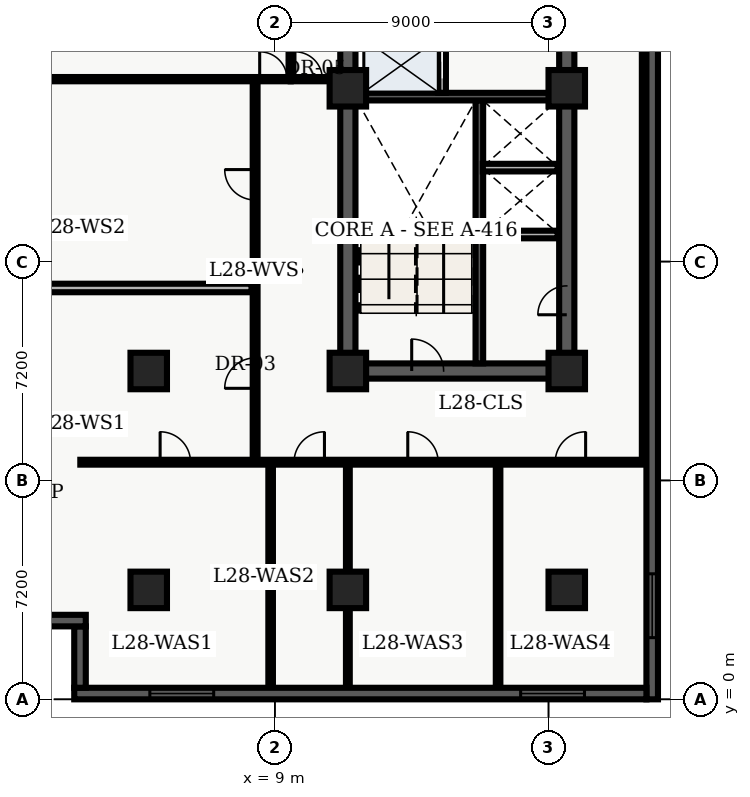
"""IFC4 building model, lengths in metres.
Left out: names, types, materials, properties, quantities, classifications, styles, units other than length and angle.
Written with IfcOpenShell. Run it as: python <this file> out.ifc"""

import sys

from ifc_helpers import new_model, entity, si_unit, converted_unit, direction, frame, origin_with_axes, origin_2d_with_axis, place, context, subcontext, project, spatial, polyline, rectangle, outline, extrude, element, fill, save


model = new_model("IFC4")
c1 = context("Model", 3, precision=1e-05, world=origin_with_axes(), true_north=direction((0.0, 1.0)))
c2 = subcontext(c1, "Body", "Model", "MODEL_VIEW")
j1 = project(units=[si_unit("LENGTHUNIT", "METRE"), converted_unit("PLANEANGLEUNIT", "DEGREE", entity("IfcPlaneAngleMeasure", 0.017), si_unit("PLANEANGLEUNIT", "RADIAN"), dimensions=[0, 0, 0, 0, 0, 0, 0])], contexts=[c1])
p1 = place(None, origin_with_axes())
s1 = spatial("IfcSite", under=j1, at=p1, CompositionType="ELEMENT")
p2 = place(p1, origin_with_axes())
s2 = spatial("IfcBuilding", under=s1, at=p2, CompositionType="ELEMENT")
p3 = place(p2, frame((0.0, 0.0, 116.4), z_axis=(0.0, 0.0, 1.0), x_axis=(1.0, 0.0, 0.0)))
s3 = spatial("IfcBuildingStorey", under=s2, at=p3, CompositionType="ELEMENT", Elevation=116.4)
p4 = place(p3, frame((11.4, 10.8, 0.0), z_axis=(0.0, 0.0, 1.0), x_axis=(0.0, 1.0, 0.0)))
e1 = element("IfcWall", 1, at=p4, inside=s3, PredefinedType="SHEAR", context=c2, shape_type="SweptSolid", body=[
    extrude(outline(polyline([(0.0, -0.25), (27.0, -0.25), (27.0, 0.25), (0.0, 0.25), (0.0, -0.25)])), origin_with_axes(), (0.0, 0.0, 1.0), 3.66),
])
p5 = place(p3, frame((11.4, 10.8, 0.0), z_axis=(0.0, 0.0, 1.0), x_axis=(1.0, 0.0, 0.0)))
e2 = element("IfcWall", 2, at=p5, inside=s3, PredefinedType="SHEAR", context=c2, shape_type="SweptSolid", body=[
    extrude(outline(polyline([(0.0, -0.25), (7.2, -0.25), (7.2, 0.25), (0.0, 0.25), (0.0, -0.25)])), origin_with_axes(), (0.0, 0.0, 1.0), 3.66),
])
p6 = place(p5, frame((2.625, 0.0, 0.0), z_axis=(0.0, 0.0, 1.0), x_axis=(1.0, 0.0, 0.0)))
e3 = element("IfcOpeningElement", 3, at=p6, cuts=e2, PredefinedType="OPENING", context=c2, shape_type="SweptSolid", body=[
    extrude(rectangle(XDim=1.05, YDim=0.52, at=origin_2d_with_axis()), origin_with_axes(), (0.0, 0.0, 1.0), 2.15),
])
p7 = place(p3, frame((18.6, 10.8, 0.0), z_axis=(0.0, 0.0, 1.0), x_axis=(0.0, 1.0, 0.0)))
e4 = element("IfcWall", 4, at=p7, inside=s3, PredefinedType="SHEAR", context=c2, shape_type="SweptSolid", body=[
    extrude(outline(polyline([(0.0, -0.25), (13.5, -0.25), (13.5, 0.25), (0.0, 0.25), (0.0, -0.25)])), origin_with_axes(), (0.0, 0.0, 1.0), 3.66),
])
p8 = place(p7, frame((11.125, 0.0, 0.0), z_axis=(0.0, 0.0, 1.0), x_axis=(1.0, 0.0, 0.0)))
e5 = element("IfcOpeningElement", 5, at=p8, cuts=e4, PredefinedType="OPENING", context=c2, shape_type="SweptSolid", body=[
    extrude(rectangle(XDim=1.05, YDim=0.52, at=origin_2d_with_axis()), origin_with_axes(), (0.0, 0.0, 1.0), 2.15),
])
p9 = place(p7, frame((2.325, 0.0, 0.0), z_axis=(0.0, 0.0, 1.0), x_axis=(1.0, 0.0, 0.0)))
e6 = element("IfcOpeningElement", 6, at=p9, cuts=e4, PredefinedType="OPENING", context=c2, shape_type="SweptSolid", body=[
    extrude(rectangle(XDim=0.95, YDim=0.52, at=origin_2d_with_axis()), origin_with_axes(), (0.0, 0.0, 1.0), 2.15),
])
p10 = place(p3, frame((15.725, 11.05, 0.0), z_axis=(0.0, 0.0, 1.0), x_axis=(0.0, 1.0, 0.0)))
e7 = element("IfcWall", 7, at=p10, inside=s3, PredefinedType="SHEAR", context=c2, shape_type="SweptSolid", body=[
    extrude(outline(polyline([(0.0, -0.125), (8.65, -0.125), (8.65, 0.125), (0.0, 0.125), (0.0, -0.125)])), origin_with_axes(), (0.0, 0.0, 1.0), 3.66),
])
p11 = place(p3, frame((11.65, 19.825, 0.0), z_axis=(0.0, 0.0, 1.0), x_axis=(1.0, 0.0, 0.0)))
e8 = element("IfcWall", 8, at=p11, inside=s3, PredefinedType="SHEAR", context=c2, shape_type="SweptSolid", body=[
    extrude(outline(polyline([(0.0, -0.125), (6.7, -0.125), (6.7, 0.125), (0.0, 0.125), (0.0, -0.125)])), origin_with_axes(), (0.0, 0.0, 1.0), 3.66),
])
p12 = place(p3, frame((14.5, 19.95, 0.0), z_axis=(0.0, 0.0, 1.0), x_axis=(0.0, 1.0, 0.0)))
e9 = element("IfcWall", 9, at=p12, inside=s3, PredefinedType="SOLIDWALL", context=c2, shape_type="SweptSolid", body=[
    extrude(outline(polyline([(0.0, -0.125), (6.25, -0.125), (6.25, 0.125), (0.0, 0.125), (0.0, -0.125)])), origin_with_axes(), (0.0, 0.0, 1.0), 2.7),
])
p13 = place(p12, frame((1.025, 0.0, 0.0), z_axis=(0.0, 0.0, 1.0), x_axis=(1.0, 0.0, 0.0)))
e10 = element("IfcOpeningElement", 10, at=p13, cuts=e9, PredefinedType="OPENING", context=c2, shape_type="SweptSolid", body=[
    extrude(rectangle(XDim=1.1, YDim=0.27, at=origin_2d_with_axis()), origin_with_axes(), (0.0, 0.0, 1.0), 2.15),
])
p14 = place(p12, frame((2.975, 0.0, 0.0), z_axis=(0.0, 0.0, 1.0), x_axis=(1.0, 0.0, 0.0)))
e11 = element("IfcOpeningElement", 11, at=p14, cuts=e9, PredefinedType="OPENING", context=c2, shape_type="SweptSolid", body=[
    extrude(rectangle(XDim=1.1, YDim=0.27, at=origin_2d_with_axis()), origin_with_axes(), (0.0, 0.0, 1.0), 2.15),
])
p15 = place(p12, frame((5.425, 0.0, 0.0), z_axis=(0.0, 0.0, 1.0), x_axis=(1.0, 0.0, 0.0)))
e12 = element("IfcOpeningElement", 12, at=p15, cuts=e9, PredefinedType="OPENING", context=c2, shape_type="SweptSolid", body=[
    extrude(rectangle(XDim=1.2, YDim=0.27, at=origin_2d_with_axis()), origin_with_axes(), (0.0, 0.0, 1.0), 2.15),
])
for number, where, z_axis, x_axis in (
    (13, (11.4, 3.6, 0.0), (0.0, 0.0, 1.0), (1.0, 0.0, 0.0)),
    (14, (11.4, 10.8, 0.0), (0.0, 0.0, 1.0), (1.0, 0.0, 0.0)),
    (15, (11.4, 20.1, 0.0), (0.0, 0.0, 1.0), (1.0, 0.0, 0.0)),
    (16, (18.6, 3.6, 0.0), (0.0, 0.0, 1.0), (1.0, 0.0, 0.0)),
    (17, (18.6, 10.8, 0.0), (0.0, 0.0, 1.0), (1.0, 0.0, 0.0)),
    (18, (18.6, 20.1, 0.0), (0.0, 0.0, 1.0), (1.0, 0.0, 0.0)),
    (19, (4.85, 3.6, 0.0), (0.0, 0.0, 1.0), (1.0, 0.0, 0.0)),
    (20, (4.85, 10.8, 0.0), (0.0, 0.0, 1.0), (1.0, 0.0, 0.0)),
):
    element("IfcColumn", number, at=place(p3, frame(where, z_axis=z_axis, x_axis=x_axis)), inside=s3, PredefinedType="COLUMN", context=c2, shape_type="SweptSolid", body=[
        extrude(rectangle(XDim=1.2, YDim=1.2, at=origin_2d_with_axis()), origin_with_axes(), (0.0, 0.0, 1.0), 3.9),
    ])
for number, where, z_axis, x_axis in (
    (21, (15.84, 15.29, 0.0), (0.0, 0.0, 1.0), (1.0, 0.0, 0.0)),
    (22, (15.84, 17.49, 0.0), (0.0, 0.0, 1.0), (1.0, 0.0, 0.0)),
):
    element("IfcWall", number, at=place(p3, frame(where, z_axis=z_axis, x_axis=x_axis)), inside=s3, PredefinedType="SOLIDWALL", context=c2, shape_type="SweptSolid", body=[
        extrude(outline(polyline([(0.0, -0.125), (2.46, -0.125), (2.46, 0.125), (0.0, 0.125), (0.0, -0.125)])), origin_with_axes(), (0.0, 0.0, 1.0), 2.7),
    ])
p16 = place(p3, frame((9.52, 20.4, 0.0), z_axis=(0.0, 0.0, 1.0), x_axis=(0.0, 1.0, 0.0)))
e23 = element("IfcWall", 23, at=p16, inside=s3, PredefinedType="PARTITIONING", context=c2, shape_type="SweptSolid", body=[
    extrude(outline(polyline([(0.0, -0.07), (4.0, -0.07), (4.0, 0.07), (0.0, 0.07), (0.0, -0.07)])), origin_with_axes(), (0.0, 0.0, 1.0), 2.7),
])
p17 = place(p3, frame((9.52, 20.4, 0.0), z_axis=(0.0, 0.0, 1.0), x_axis=(1.0, 0.0, 0.0)))
e24 = element("IfcWall", 24, at=p17, inside=s3, PredefinedType="PARTITIONING", context=c2, shape_type="SweptSolid", body=[
    extrude(outline(polyline([(0.0, -0.07), (1.58, -0.07), (1.58, 0.07), (0.0, 0.07), (0.0, -0.07)])), origin_with_axes(), (0.0, 0.0, 1.0), 2.7),
])
p18 = place(p17, frame((0.59, 0.0, 0.0), z_axis=(0.0, 0.0, 1.0), x_axis=(1.0, 0.0, 0.0)))
e25 = element("IfcOpeningElement", 25, at=p18, cuts=e24, PredefinedType="OPENING", context=c2, shape_type="SweptSolid", body=[
    extrude(rectangle(XDim=0.9, YDim=0.16, at=origin_2d_with_axis()), origin_with_axes(), (0.0, 0.0, 1.0), 2.15),
])
p19 = place(p3, frame((2.6, 7.8, 0.0), z_axis=(0.0, 0.0, 1.0), x_axis=(1.0, 0.0, 0.0)))
e26 = element("IfcWall", 26, at=p19, inside=s3, PredefinedType="PARTITIONING", context=c2, shape_type="SweptSolid", body=[
    extrude(outline(polyline([(0.0, -0.08), (18.625, -0.08), (18.625, 0.08), (0.0, 0.08), (0.0, -0.08)])), origin_with_axes(), (0.0, 0.0, 1.0), 2.7),
])
p20 = place(p19, frame((3.125, 0.0, 0.0), z_axis=(0.0, 0.0, 1.0), x_axis=(1.0, 0.0, 0.0)))
e27 = element("IfcOpeningElement", 27, at=p20, cuts=e26, PredefinedType="OPENING", context=c2, shape_type="SweptSolid", body=[
    extrude(rectangle(XDim=1.0, YDim=0.18, at=origin_2d_with_axis()), origin_with_axes(), (0.0, 0.0, 1.0), 2.15),
])
p21 = place(p19, frame((7.53, 0.0, 0.0), z_axis=(0.0, 0.0, 1.0), x_axis=(1.0, 0.0, 0.0)))
e28 = element("IfcOpeningElement", 28, at=p21, cuts=e26, PredefinedType="OPENING", context=c2, shape_type="SweptSolid", body=[
    extrude(rectangle(XDim=1.0, YDim=0.18, at=origin_2d_with_axis()), origin_with_axes(), (0.0, 0.0, 1.0), 2.15),
])
p22 = place(p19, frame((11.271, 0.0, 0.0), z_axis=(0.0, 0.0, 1.0), x_axis=(1.0, 0.0, 0.0)))
e29 = element("IfcOpeningElement", 29, at=p22, cuts=e26, PredefinedType="OPENING", context=c2, shape_type="SweptSolid", body=[
    extrude(rectangle(XDim=1.0, YDim=0.18, at=origin_2d_with_axis()), origin_with_axes(), (0.0, 0.0, 1.0), 2.15),
])
p23 = place(p19, frame((16.12, 0.0, 0.0), z_axis=(0.0, 0.0, 1.0), x_axis=(1.0, 0.0, 0.0)))
e30 = element("IfcOpeningElement", 30, at=p23, cuts=e26, PredefinedType="OPENING", context=c2, shape_type="SweptSolid", body=[
    extrude(rectangle(XDim=1.0, YDim=0.18, at=origin_2d_with_axis()), origin_with_axes(), (0.0, 0.0, 1.0), 2.15),
])
p24 = place(p3, frame((21.15, 7.8, 0.0), z_axis=(0.0, 0.0, 1.0), x_axis=(0.0, 1.0, 0.0)))
e31 = element("IfcWall", 31, at=p24, inside=s3, PredefinedType="PARTITIONING", context=c2, shape_type="SweptSolid", body=[
    extrude(outline(polyline([(0.0, -0.08), (32.7, -0.08), (32.7, 0.08), (0.0, 0.08), (0.0, -0.08)])), origin_with_axes(), (0.0, 0.0, 1.0), 2.7),
])
p25 = place(p3, frame((8.35, 7.8, 0.0), z_axis=(0.0, 0.0, 1.0), x_axis=(0.0, 1.0, 0.0)))
e32 = element("IfcWall", 32, at=p25, inside=s3, PredefinedType="PARTITIONING", context=c2, shape_type="SweptSolid", body=[
    extrude(outline(polyline([(0.0, -0.08), (12.6, -0.08), (12.6, 0.08), (0.0, 0.08), (0.0, -0.08)])), origin_with_axes(), (0.0, 0.0, 1.0), 2.7),
])
p26 = place(p25, frame((2.93, 0.0, 0.0), z_axis=(0.0, 0.0, 1.0), x_axis=(1.0, 0.0, 0.0)))
e33 = element("IfcOpeningElement", 33, at=p26, cuts=e32, PredefinedType="OPENING", context=c2, shape_type="SweptSolid", body=[
    extrude(rectangle(XDim=1.0, YDim=0.18, at=origin_2d_with_axis()), origin_with_axes(), (0.0, 0.0, 1.0), 2.15),
])
p27 = place(p25, frame((9.126, 0.0, 0.0), z_axis=(0.0, 0.0, 1.0), x_axis=(1.0, 0.0, 0.0)))
e34 = element("IfcOpeningElement", 34, at=p27, cuts=e32, PredefinedType="OPENING", context=c2, shape_type="SweptSolid", body=[
    extrude(rectangle(XDim=1.0, YDim=0.18, at=origin_2d_with_axis()), origin_with_axes(), (0.0, 0.0, 1.0), 2.15),
])
p28 = place(p3, frame((0.36, 20.4, 0.0), z_axis=(0.0, 0.0, 1.0), x_axis=(1.0, 0.0, 0.0)))
e35 = element("IfcWall", 35, at=p28, inside=s3, PredefinedType="PARTITIONING", context=c2, shape_type="SweptSolid", body=[
    extrude(outline(polyline([(0.0, -0.07), (9.16, -0.07), (9.16, 0.07), (0.0, 0.07), (0.0, -0.07)])), origin_with_axes(), (0.0, 0.0, 1.0), 2.7),
])
p29 = place(p28, frame((8.59, 0.0, 0.0), z_axis=(0.0, 0.0, 1.0), x_axis=(1.0, 0.0, 0.0)))
e36 = element("IfcOpeningElement", 36, at=p29, cuts=e35, PredefinedType="OPENING", context=c2, shape_type="SweptSolid", body=[
    extrude(rectangle(XDim=0.9, YDim=0.16, at=origin_2d_with_axis()), origin_with_axes(), (0.0, 0.0, 1.0), 2.15),
])
p30 = place(p3, frame((0.375, 13.531, 0.0), z_axis=(0.0, 0.0, 1.0), x_axis=(1.0, 0.0, 0.0)))
e37 = element("IfcWall", 37, at=p30, inside=s3, PredefinedType="PARTITIONING", context=c2, shape_type="SweptSolid", body=[
    extrude(outline(polyline([(0.0, -0.14), (7.855, -0.14), (7.855, 0.14), (0.0, 0.14), (0.0, -0.14)])), origin_with_axes(), (0.0, 0.0, 1.0), 2.7),
])
p31 = place(p3, frame((8.86, 0.36, 0.0), z_axis=(0.0, 0.0, 1.0), x_axis=(0.0, 1.0, 0.0)))
e38 = element("IfcWall", 38, at=p31, inside=s3, PredefinedType="PARTITIONING", context=c2, shape_type="SweptSolid", body=[
    extrude(outline(polyline([(0.0, -0.075), (7.34, -0.075), (7.34, 0.075), (0.0, 0.075), (0.0, -0.075)])), origin_with_axes(), (0.0, 0.0, 1.0), 2.7),
])
p32 = place(p3, frame((11.4, 0.36, 0.0), z_axis=(0.0, 0.0, 1.0), x_axis=(0.0, 1.0, 0.0)))
e39 = element("IfcWall", 39, at=p32, inside=s3, PredefinedType="PARTITIONING", context=c2, shape_type="SweptSolid", body=[
    extrude(outline(polyline([(0.0, -0.062), (7.34, -0.062), (7.34, 0.062), (0.0, 0.062), (0.0, -0.062)])), origin_with_axes(), (0.0, 0.0, 1.0), 2.7),
])
p33 = place(p3, frame((16.341, 0.36, 0.0), z_axis=(0.0, 0.0, 1.0), x_axis=(0.0, 1.0, 0.0)))
e40 = element("IfcWall", 40, at=p33, inside=s3, PredefinedType="PARTITIONING", context=c2, shape_type="SweptSolid", body=[
    extrude(outline(polyline([(0.0, -0.075), (7.34, -0.075), (7.34, 0.075), (0.0, 0.075), (0.0, -0.075)])), origin_with_axes(), (0.0, 0.0, 1.0), 2.7),
])
p34 = place(p3, frame((21.41, 45.82, 0.0), z_axis=(0.0, 0.0, 1.0), x_axis=(0.0, -1.0, 0.0)))
e41 = element("IfcWall", 41, at=p34, inside=s3, PredefinedType="SOLIDWALL", context=c2, shape_type="SweptSolid", body=[
    extrude(outline(polyline([(0.0, -0.19), (45.82, -0.19), (45.82, 0.19), (0.0, 0.19), (0.0, -0.19)])), origin_with_axes(), (0.0, 0.0, 1.0), 3.66),
])
p35 = place(p34, frame((3.079, 0.0, 0.45), z_axis=(0.0, 0.0, 1.0), x_axis=(1.0, 0.0, 0.0)))
e42 = element("IfcOpeningElement", 42, at=p35, cuts=e41, PredefinedType="OPENING", context=c2, shape_type="SweptSolid", body=[
    extrude(rectangle(XDim=2.1, YDim=0.4, at=origin_2d_with_axis()), origin_with_axes(), (0.0, 0.0, 1.0), 2.2),
])
p36 = place(p34, frame((42.741, 0.0, 0.45), z_axis=(0.0, 0.0, 1.0), x_axis=(1.0, 0.0, 0.0)))
e43 = element("IfcOpeningElement", 43, at=p36, cuts=e41, PredefinedType="OPENING", context=c2, shape_type="SweptSolid", body=[
    extrude(rectangle(XDim=2.1, YDim=0.4, at=origin_2d_with_axis()), origin_with_axes(), (0.0, 0.0, 1.0), 2.2),
])
p37 = place(p3, frame((21.22, 0.19, 0.0), z_axis=(0.0, 0.0, 1.0), x_axis=(-1.0, 0.0, 0.0)))
e44 = element("IfcWall", 44, at=p37, inside=s3, PredefinedType="SOLIDWALL", context=c2, shape_type="SweptSolid", body=[
    extrude(outline(polyline([(0.0, -0.19), (18.82, -0.19), (18.82, 0.19), (0.0, 0.19), (0.0, -0.19)])), origin_with_axes(), (0.0, 0.0, 1.0), 3.66),
])
p38 = place(p37, frame((3.087, 0.0, 0.45), z_axis=(0.0, 0.0, 1.0), x_axis=(1.0, 0.0, 0.0)))
e45 = element("IfcOpeningElement", 45, at=p38, cuts=e44, PredefinedType="OPENING", context=c2, shape_type="SweptSolid", body=[
    extrude(rectangle(XDim=2.1, YDim=0.4, at=origin_2d_with_axis()), origin_with_axes(), (0.0, 0.0, 1.0), 2.2),
])
p39 = place(p37, frame((15.283, 0.0, 0.45), z_axis=(0.0, 0.0, 1.0), x_axis=(1.0, 0.0, 0.0)))
e46 = element("IfcOpeningElement", 46, at=p39, cuts=e44, PredefinedType="OPENING", context=c2, shape_type="SweptSolid", body=[
    extrude(rectangle(XDim=2.1, YDim=0.4, at=origin_2d_with_axis()), origin_with_axes(), (0.0, 0.0, 1.0), 2.2),
])
p40 = place(p3, frame((2.59, 0.38, 0.0), z_axis=(0.0, 0.0, 1.0), x_axis=(0.0, 1.0, 0.0)))
e47 = element("IfcWall", 47, at=p40, inside=s3, PredefinedType="SOLIDWALL", context=c2, shape_type="SweptSolid", body=[
    extrude(outline(polyline([(0.0, -0.19), (2.02, -0.19), (2.02, 0.19), (0.0, 0.19), (0.0, -0.19)])), origin_with_axes(), (0.0, 0.0, 1.0), 3.66),
])
p41 = place(p3, frame((2.78, 2.59, 0.0), z_axis=(0.0, 0.0, 1.0), x_axis=(-1.0, 0.0, 0.0)))
e48 = element("IfcWall", 48, at=p41, inside=s3, PredefinedType="SOLIDWALL", context=c2, shape_type="SweptSolid", body=[
    extrude(outline(polyline([(0.0, -0.19), (2.78, -0.19), (2.78, 0.19), (0.0, 0.19), (0.0, -0.19)])), origin_with_axes(), (0.0, 0.0, 1.0), 3.66),
])
p42 = place(p12, frame((1.025, 0.0, 0.0), z_axis=(0.0, 0.0, 1.0), x_axis=(1.0, 0.0, 0.0)))
e49 = element("IfcDoor", 49, at=p42, inside=s3, OperationType="SLIDING_TO_LEFT", PredefinedType="DOOR", context=c2, shape_type="SweptSolid", body=[
    extrude(rectangle(XDim=1.1, YDim=0.09, at=origin_2d_with_axis()), origin_with_axes(), (0.0, 0.0, 1.0), 2.15),
])
fill(e10, e49)
p43 = place(p5, frame((2.625, 0.0, 0.0), z_axis=(0.0, 0.0, 1.0), x_axis=(1.0, 0.0, 0.0)))
e50 = element("IfcDoor", 50, at=p43, inside=s3, OperationType="SINGLE_SWING_LEFT", PredefinedType="DOOR", context=c2, shape_type="SweptSolid", body=[
    extrude(rectangle(XDim=1.05, YDim=0.09, at=origin_2d_with_axis()), origin_with_axes(), (0.0, 0.0, 1.0), 2.15),
])
fill(e3, e50)
p44 = place(p7, frame((2.325, 0.0, 0.0), z_axis=(0.0, 0.0, 1.0), x_axis=(1.0, 0.0, 0.0)))
e51 = element("IfcDoor", 51, at=p44, inside=s3, OperationType="SINGLE_SWING_LEFT", PredefinedType="DOOR", context=c2, shape_type="SweptSolid", body=[
    extrude(rectangle(XDim=0.95, YDim=0.09, at=origin_2d_with_axis()), origin_with_axes(), (0.0, 0.0, 1.0), 2.15),
])
fill(e6, e51)
p45 = place(p17, frame((0.59, 0.0, 0.0), z_axis=(0.0, 0.0, 1.0), x_axis=(1.0, 0.0, 0.0)))
e52 = element("IfcDoor", 52, at=p45, inside=s3, OperationType="SINGLE_SWING_LEFT", PredefinedType="DOOR", context=c2, shape_type="SweptSolid", body=[
    extrude(rectangle(XDim=0.9, YDim=0.084, at=origin_2d_with_axis()), origin_with_axes(), (0.0, 0.0, 1.0), 2.15),
])
fill(e25, e52)
p46 = place(p28, frame((8.59, 0.0, 0.0), z_axis=(0.0, 0.0, 1.0), x_axis=(1.0, 0.0, 0.0)))
e53 = element("IfcDoor", 53, at=p46, inside=s3, OperationType="SINGLE_SWING_LEFT", PredefinedType="DOOR", context=c2, shape_type="SweptSolid", body=[
    extrude(rectangle(XDim=0.9, YDim=0.084, at=origin_2d_with_axis()), origin_with_axes(), (0.0, 0.0, 1.0), 2.15),
])
fill(e36, e53)
p47 = place(p25, frame((2.93, 0.0, 0.0), z_axis=(0.0, 0.0, 1.0), x_axis=(1.0, 0.0, 0.0)))
e54 = element("IfcDoor", 54, at=p47, inside=s3, OperationType="SINGLE_SWING_LEFT", PredefinedType="DOOR", context=c2, shape_type="SweptSolid", body=[
    extrude(rectangle(XDim=1.0, YDim=0.09, at=origin_2d_with_axis()), origin_with_axes(), (0.0, 0.0, 1.0), 2.15),
])
fill(e33, e54)
p48 = place(p25, frame((9.126, 0.0, 0.0), z_axis=(0.0, 0.0, 1.0), x_axis=(1.0, 0.0, 0.0)))
e55 = element("IfcDoor", 55, at=p48, inside=s3, OperationType="SINGLE_SWING_RIGHT", PredefinedType="DOOR", context=c2, shape_type="SweptSolid", body=[
    extrude(rectangle(XDim=1.0, YDim=0.09, at=origin_2d_with_axis()), origin_with_axes(), (0.0, 0.0, 1.0), 2.15),
])
fill(e34, e55)
p49 = place(p19, frame((3.125, 0.0, 0.0), z_axis=(0.0, 0.0, 1.0), x_axis=(1.0, 0.0, 0.0)))
e56 = element("IfcDoor", 56, at=p49, inside=s3, OperationType="SINGLE_SWING_LEFT", PredefinedType="DOOR", context=c2, shape_type="SweptSolid", body=[
    extrude(rectangle(XDim=1.0, YDim=0.09, at=origin_2d_with_axis()), origin_with_axes(), (0.0, 0.0, 1.0), 2.15),
])
fill(e27, e56)
p50 = place(p19, frame((7.53, 0.0, 0.0), z_axis=(0.0, 0.0, 1.0), x_axis=(1.0, 0.0, 0.0)))
e57 = element("IfcDoor", 57, at=p50, inside=s3, OperationType="SINGLE_SWING_RIGHT", PredefinedType="DOOR", context=c2, shape_type="SweptSolid", body=[
    extrude(rectangle(XDim=1.0, YDim=0.09, at=origin_2d_with_axis()), origin_with_axes(), (0.0, 0.0, 1.0), 2.15),
])
fill(e28, e57)
p51 = place(p19, frame((11.271, 0.0, 0.0), z_axis=(0.0, 0.0, 1.0), x_axis=(1.0, 0.0, 0.0)))
e58 = element("IfcDoor", 58, at=p51, inside=s3, OperationType="SINGLE_SWING_LEFT", PredefinedType="DOOR", context=c2, shape_type="SweptSolid", body=[
    extrude(rectangle(XDim=1.0, YDim=0.09, at=origin_2d_with_axis()), origin_with_axes(), (0.0, 0.0, 1.0), 2.15),
])
fill(e29, e58)
p52 = place(p19, frame((16.12, 0.0, 0.0), z_axis=(0.0, 0.0, 1.0), x_axis=(1.0, 0.0, 0.0)))
e59 = element("IfcDoor", 59, at=p52, inside=s3, OperationType="SINGLE_SWING_RIGHT", PredefinedType="DOOR", context=c2, shape_type="SweptSolid", body=[
    extrude(rectangle(XDim=1.0, YDim=0.09, at=origin_2d_with_axis()), origin_with_axes(), (0.0, 0.0, 1.0), 2.15),
])
fill(e30, e59)
p53 = place(p34, frame((42.741, 0.0, 0.45), z_axis=(0.0, 0.0, 1.0), x_axis=(1.0, 0.0, 0.0)))
e60 = element("IfcWindow", 60, at=p53, inside=s3, PredefinedType="WINDOW", context=c2, shape_type="SweptSolid", body=[
    extrude(rectangle(XDim=2.1, YDim=0.09, at=origin_2d_with_axis()), origin_with_axes(), (0.0, 0.0, 1.0), 2.2),
])
fill(e43, e60)
p54 = place(p37, frame((3.087, 0.0, 0.45), z_axis=(0.0, 0.0, 1.0), x_axis=(1.0, 0.0, 0.0)))
e61 = element("IfcWindow", 61, at=p54, inside=s3, PredefinedType="WINDOW", context=c2, shape_type="SweptSolid", body=[
    extrude(rectangle(XDim=2.1, YDim=0.09, at=origin_2d_with_axis()), origin_with_axes(), (0.0, 0.0, 1.0), 2.2),
])
fill(e45, e61)
p55 = place(p37, frame((15.283, 0.0, 0.45), z_axis=(0.0, 0.0, 1.0), x_axis=(1.0, 0.0, 0.0)))
e62 = element("IfcWindow", 62, at=p55, inside=s3, PredefinedType="WINDOW", context=c2, shape_type="SweptSolid", body=[
    extrude(rectangle(XDim=2.1, YDim=0.09, at=origin_2d_with_axis()), origin_with_axes(), (0.0, 0.0, 1.0), 2.2),
])
fill(e46, e62)
save(model, sys.argv[1])
